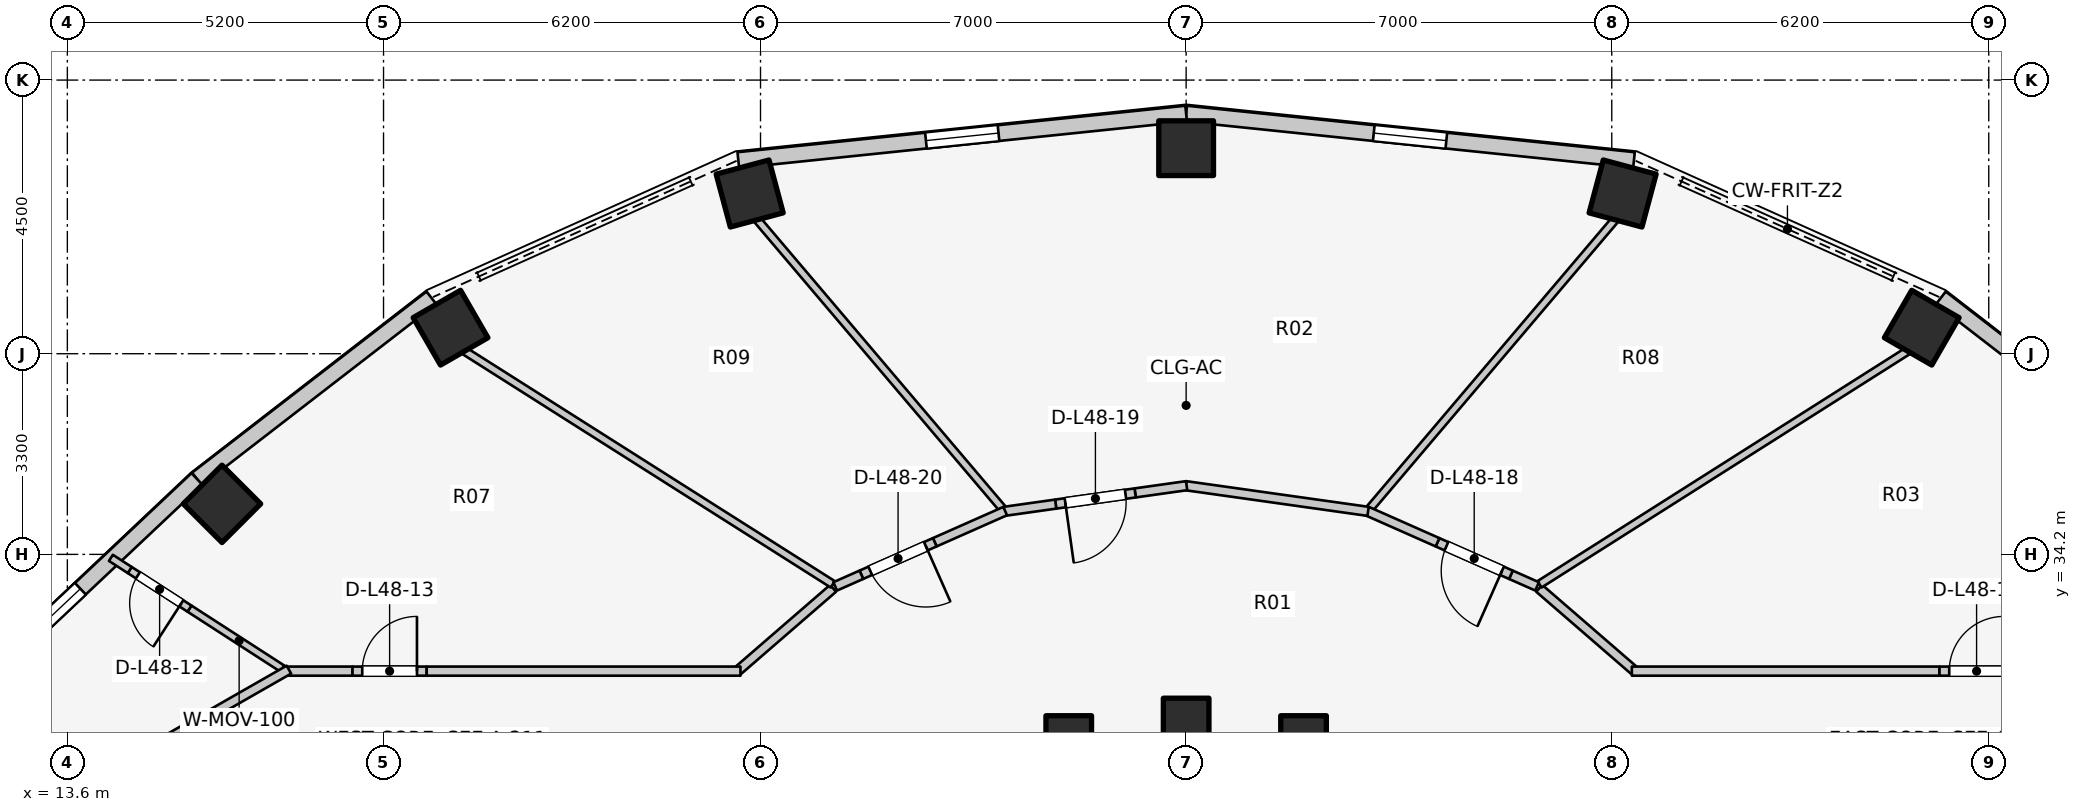
"""IFC4 building model, lengths in metres.
Left out: names, types, materials, properties, quantities, classifications, styles, units other than length and angle.
Written with IfcOpenShell. Run it as: python <this file> out.ifc"""

import sys

from ifc_helpers import new_model, si_unit, direction, frame, frame_2d, origin, origin_2d, place, context, subcontext, project, spatial, rectangle, extrude, element, fill, save


model = new_model("IFC4")
c1 = context("Model", 3, precision=1e-05, world=origin(), true_north=direction((0.0, 1.0)))
c2 = subcontext(c1, "Body", "Model", "MODEL_VIEW")
j1 = project(units=[si_unit("LENGTHUNIT", "METRE"), si_unit("PLANEANGLEUNIT", "RADIAN")], contexts=[c1])
p1 = place(None, origin())
s1 = spatial("IfcSite", under=j1, at=p1, CompositionType="ELEMENT")
p2 = place(p1, origin())
s2 = spatial("IfcBuilding", under=s1, at=p2, CompositionType="ELEMENT")
p3 = place(p2, frame((0.0, 0.0, 159.1)))
s3 = spatial("IfcBuildingStorey", under=s2, at=p3, CompositionType="ELEMENT", Elevation=159.1)
p4 = place(p3, frame((44.098, 37.928, 0.0), z_axis=(0.0, 0.0, 1.0), x_axis=(0.5, 0.866025403784, 0.0)))
e1 = element("IfcColumn", 1, at=p4, inside=s3, PredefinedType="COLUMN", context=c2, shape_type="SweptSolid", body=[
    extrude(rectangle(XDim=0.9, YDim=0.9, at=origin_2d()), origin(), (0.0, 0.0, 1.0), 3.1),
])
p5 = place(p3, frame((33.931, 31.172, 0.0), z_axis=(0.0, 0.0, 1.0), x_axis=(1.0, 0.0, 0.0)))
e2 = element("IfcColumn", 2, at=p5, inside=s3, PredefinedType="COLUMN", context=c2, shape_type="SweptSolid", body=[
    extrude(rectangle(XDim=0.75, YDim=0.75, at=origin_2d()), origin(), (0.0, 0.0, 1.0), 3.1),
])
p6 = place(p3, frame((39.178, 40.135, 0.0), z_axis=(0.0, 0.0, 1.0), x_axis=(0.258819045103, 0.965925826289, 0.0)))
e3 = element("IfcColumn", 3, at=p6, inside=s3, PredefinedType="COLUMN", context=c2, shape_type="SweptSolid", body=[
    extrude(rectangle(XDim=0.9, YDim=0.9, at=origin_2d()), origin(), (0.0, 0.0, 1.0), 3.1),
])
p7 = place(p3, frame((32.0, 31.46, 0.0), z_axis=(0.0, 0.0, 1.0), x_axis=(1.0, 0.0, 0.0)))
e4 = element("IfcColumn", 4, at=p7, inside=s3, PredefinedType="COLUMN", context=c2, shape_type="SweptSolid", body=[
    extrude(rectangle(XDim=0.75, YDim=0.75, at=origin_2d()), origin(), (0.0, 0.0, 1.0), 3.1),
])
p8 = place(p3, frame((32.0, 40.88, 0.0), z_axis=(0.0, 0.0, 1.0), x_axis=(0.0, 1.0, 0.0)))
e5 = element("IfcColumn", 5, at=p8, inside=s3, PredefinedType="COLUMN", context=c2, shape_type="SweptSolid", body=[
    extrude(rectangle(XDim=0.9, YDim=0.9, at=origin_2d()), origin(), (0.0, 0.0, 1.0), 3.1),
])
p9 = place(p3, frame((30.069, 31.172, 0.0), z_axis=(0.0, 0.0, 1.0), x_axis=(1.0, 0.0, 0.0)))
e6 = element("IfcColumn", 6, at=p9, inside=s3, PredefinedType="COLUMN", context=c2, shape_type="SweptSolid", body=[
    extrude(rectangle(XDim=0.75, YDim=0.75, at=origin_2d()), origin(), (0.0, 0.0, 1.0), 3.1),
])
for number, where, z_axis, x_axis in (
    (7, (24.822, 40.135, 0.0), (0.0, 0.0, 1.0), (-0.259, 0.966, 0.0)),
    (8, (19.902, 37.928, 0.0), (0.0, 0.0, 1.0), (-0.5, 0.866, 0.0)),
    (9, (16.143, 35.031, 0.0), (0.0, 0.0, 1.0), (-0.707, 0.707, 0.0)),
):
    element("IfcColumn", number, at=place(p3, frame(where, z_axis=z_axis, x_axis=x_axis)), inside=s3, PredefinedType="COLUMN", context=c2, shape_type="SweptSolid", body=[
        extrude(rectangle(XDim=0.9, YDim=0.9, at=origin_2d()), origin(), (0.0, 0.0, 1.0), 3.1),
    ])
p10 = place(p3, frame((48.269, 35.441, 0.0), z_axis=(0.0, 0.0, 1.0), x_axis=(-0.791460185804, 0.611220724687, 0.0)))
e10 = element("IfcWall", 10, at=p10, inside=s3, PredefinedType="STANDARD", context=c2, shape_type="SweptSolid", body=[
    extrude(rectangle(XDim=4.872, YDim=0.26, at=frame_2d((2.436, 0.0))), origin(), (0.0, 0.0, 1.0), 1.22),
])
p11 = place(p3, frame((39.365, 40.685, 0.0), z_axis=(0.0, 0.0, 1.0), x_axis=(-0.994664178965, 0.10316574569, 0.0)))
e11 = element("IfcWall", 11, at=p11, inside=s3, PredefinedType="STANDARD", context=c2, shape_type="SweptSolid", body=[
    extrude(rectangle(XDim=7.405, YDim=0.26, at=frame_2d((3.702, 0.0))), origin(), (0.0, 0.0, 1.0), 1.22),
])
p12 = place(p11, frame((3.102, 0.0, 0.15)))
e12 = element("IfcOpeningElement", 12, at=p12, cuts=e11, PredefinedType="OPENING", context=c2, shape_type="SweptSolid", body=[
    extrude(rectangle(XDim=1.2, YDim=0.9, at=frame_2d((0.6, 0.45))), frame((0.0, 0.14, 0.0), z_axis=(0.0, -1.0, 0.0), x_axis=(1.0, 0.0, 0.0)), (0.0, 0.0, 1.0), 0.28),
])
p13 = place(p3, frame((32.0, 41.448, 0.0), z_axis=(0.0, 0.0, 1.0), x_axis=(-0.994664178965, -0.10316574569, 0.0)))
e13 = element("IfcWall", 13, at=p13, inside=s3, PredefinedType="STANDARD", context=c2, shape_type="SweptSolid", body=[
    extrude(rectangle(XDim=7.405, YDim=0.26, at=frame_2d((3.702, 0.0))), origin(), (0.0, 0.0, 1.0), 1.22),
])
p14 = place(p13, frame((3.102, 0.0, 0.15)))
e14 = element("IfcOpeningElement", 14, at=p14, cuts=e13, PredefinedType="OPENING", context=c2, shape_type="SweptSolid", body=[
    extrude(rectangle(XDim=1.2, YDim=0.9, at=frame_2d((0.6, 0.45))), frame((0.0, 0.14, 0.0), z_axis=(0.0, -1.0, 0.0), x_axis=(1.0, 0.0, 0.0)), (0.0, 0.0, 1.0), 0.28),
])
p15 = place(p3, frame((19.587, 38.419, 0.0), z_axis=(0.0, 0.0, 1.0), x_axis=(-0.791460185804, -0.611220724687, 0.0)))
e15 = element("IfcWall", 15, at=p15, inside=s3, PredefinedType="STANDARD", context=c2, shape_type="SweptSolid", body=[
    extrude(rectangle(XDim=4.872, YDim=0.26, at=frame_2d((2.436, 0.0))), origin(), (0.0, 0.0, 1.0), 1.22),
])
p16 = place(p3, frame((15.731, 35.441, 0.0), z_axis=(0.0, 0.0, 1.0), x_axis=(-0.727667301037, -0.68593024354, 0.0)))
e16 = element("IfcWall", 16, at=p16, inside=s3, PredefinedType="STANDARD", context=c2, shape_type="SweptSolid", body=[
    extrude(rectangle(XDim=4.604, YDim=0.26, at=frame_2d((2.302, 0.0))), origin(), (0.0, 0.0, 1.0), 1.22),
])
p17 = place(p16, frame((2.634, 0.0, 0.15)))
e17 = element("IfcOpeningElement", 17, at=p17, cuts=e16, PredefinedType="OPENING", context=c2, shape_type="SweptSolid", body=[
    extrude(rectangle(XDim=1.2, YDim=0.9, at=frame_2d((0.6, 0.45))), frame((0.0, 0.14, 0.0), z_axis=(0.0, -1.0, 0.0), x_axis=(1.0, 0.0, 0.0)), (0.0, 0.0, 1.0), 0.28),
])
p18 = place(p3, frame((37.807, 33.642, 0.0), z_axis=(0.0, 0.0, 1.0), x_axis=(0.756055312247, -0.654507727092, 0.0)))
e18 = element("IfcWall", 18, at=p18, inside=s3, PredefinedType="PARTITIONING", context=c2, shape_type="SweptSolid", body=[
    extrude(rectangle(XDim=2.111, YDim=0.15, at=frame_2d((1.055, 0.0))), origin(), (0.0, 0.0, 1.0), 1.22),
])
p19 = place(p3, frame((39.33, 32.28, 0.0), z_axis=(0.0, 0.0, 1.0), x_axis=(1.0, 0.0, 0.0)))
e19 = element("IfcWall", 19, at=p19, inside=s3, PredefinedType="PARTITIONING", context=c2, shape_type="SweptSolid", body=[
    extrude(rectangle(XDim=5.06, YDim=0.15, at=frame_2d((2.53, 0.0))), origin(), (0.0, 0.0, 1.0), 1.22),
])
p20 = place(p3, frame((44.39, 32.28, 0.0), z_axis=(0.0, 0.0, 1.0), x_axis=(1.0, 0.0, 0.0)))
e20 = element("IfcWall", 20, at=p20, inside=s3, PredefinedType="PARTITIONING", context=c2, shape_type="SweptSolid", body=[
    extrude(rectangle(XDim=1.22, YDim=0.15, at=frame_2d((0.61, 0.0))), origin(), (0.0, 0.0, 1.0), 2.16),
])
p21 = place(p20, frame((0.16, 0.0, 0.0)))
e21 = element("IfcOpeningElement", 21, at=p21, cuts=e20, PredefinedType="OPENING", context=c2, shape_type="SweptSolid", body=[
    extrude(rectangle(XDim=0.9, YDim=2.1, at=frame_2d((0.45, 1.05))), frame((0.0, 0.085, 0.0), z_axis=(0.0, -1.0, 0.0), x_axis=(1.0, 0.0, 0.0)), (0.0, 0.0, 1.0), 0.17),
])
p22 = place(p3, frame((17.242, 32.253, 0.0), z_axis=(0.0, 0.0, 1.0), x_axis=(-0.839960690577, 0.542647250325, 0.0)))
e22 = element("IfcWall", 22, at=p22, inside=s3, PredefinedType="MOVABLE", context=c2, shape_type="SweptSolid", body=[
    extrude(rectangle(XDim=1.945, YDim=0.12, at=frame_2d((0.972, 0.0))), origin(), (0.0, 0.0, 1.0), 1.22),
])
p23 = place(p3, frame((15.609, 33.308, 0.0), z_axis=(0.0, 0.0, 1.0), x_axis=(-0.839989837614, 0.542602131129, 0.0)))
e23 = element("IfcWall", 23, at=p23, inside=s3, PredefinedType="MOVABLE", context=c2, shape_type="SweptSolid", body=[
    extrude(rectangle(XDim=1.17, YDim=0.12, at=frame_2d((0.585, 0.0))), origin(), (0.0, 0.0, 1.0), 2.11),
])
p24 = place(p23, frame((0.16, 0.0, 0.0)))
e24 = element("IfcOpeningElement", 24, at=p24, cuts=e23, PredefinedType="OPENING", context=c2, shape_type="SweptSolid", body=[
    extrude(rectangle(XDim=0.85, YDim=2.05, at=frame_2d((0.425, 1.025))), frame((0.0, 0.07, 0.0), z_axis=(0.0, -1.0, 0.0), x_axis=(1.0, 0.0, 0.0)), (0.0, 0.0, 1.0), 0.14),
])
p25 = place(p3, frame((14.626, 33.943, 0.0), z_axis=(0.0, 0.0, 1.0), x_axis=(-0.840014217141, 0.542564387885, 0.0)))
e25 = element("IfcWall", 25, at=p25, inside=s3, PredefinedType="MOVABLE", context=c2, shape_type="SweptSolid", body=[
    extrude(rectangle(XDim=0.368, YDim=0.12, at=frame_2d((0.184, 0.0))), origin(), (0.0, 0.0, 1.0), 2.575),
])
p26 = place(p3, frame((26.193, 33.642, 0.0), z_axis=(0.0, 0.0, 1.0), x_axis=(-0.756055312247, -0.654507727092, 0.0)))
e26 = element("IfcWall", 26, at=p26, inside=s3, PredefinedType="PARTITIONING", context=c2, shape_type="SweptSolid", body=[
    extrude(rectangle(XDim=2.111, YDim=0.15, at=frame_2d((1.055, 0.0))), origin(), (0.0, 0.0, 1.0), 1.22),
])
p27 = place(p3, frame((17.15, 32.28, 0.0), z_axis=(0.0, 0.0, 1.0), x_axis=(1.0, 0.0, 0.0)))
e27 = element("IfcWall", 27, at=p27, inside=s3, PredefinedType="PARTITIONING", context=c2, shape_type="SweptSolid", body=[
    extrude(rectangle(XDim=1.14, YDim=0.15, at=frame_2d((0.57, 0.0))), origin(), (0.0, 0.0, 1.0), 2.575),
])
p28 = place(p3, frame((18.29, 32.28, 0.0), z_axis=(0.0, 0.0, 1.0), x_axis=(1.0, 0.0, 0.0)))
e28 = element("IfcWall", 28, at=p28, inside=s3, PredefinedType="PARTITIONING", context=c2, shape_type="SweptSolid", body=[
    extrude(rectangle(XDim=1.22, YDim=0.15, at=frame_2d((0.61, 0.0))), origin(), (0.0, 0.0, 1.0), 2.575),
])
p29 = place(p28, frame((0.16, 0.0, 0.0)))
e29 = element("IfcOpeningElement", 29, at=p29, cuts=e28, PredefinedType="OPENING", context=c2, shape_type="SweptSolid", body=[
    extrude(rectangle(XDim=0.9, YDim=2.1, at=frame_2d((0.45, 1.05))), frame((0.0, 0.085, 0.0), z_axis=(0.0, -1.0, 0.0), x_axis=(1.0, 0.0, 0.0)), (0.0, 0.0, 1.0), 0.17),
])
p30 = place(p3, frame((19.51, 32.28, 0.0), z_axis=(0.0, 0.0, 1.0), x_axis=(1.0, 0.0, 0.0)))
e30 = element("IfcWall", 30, at=p30, inside=s3, PredefinedType="PARTITIONING", context=c2, shape_type="SweptSolid", body=[
    extrude(rectangle(XDim=5.16, YDim=0.15, at=frame_2d((2.58, 0.0))), origin(), (0.0, 0.0, 1.0), 1.22),
])
p31 = place(p3, frame((17.243, 32.305, 0.0), z_axis=(0.0, 0.0, 1.0), x_axis=(-0.867991349648, -0.496579315857, 0.0)))
e31 = element("IfcWall", 31, at=p31, inside=s3, PredefinedType="PARTITIONING", context=c2, shape_type="SweptSolid", body=[
    extrude(rectangle(XDim=2.567, YDim=0.15, at=frame_2d((1.283, 0.0))), origin(), (0.0, 0.0, 1.0), 1.22),
])
p32 = place(p3, frame((37.812, 33.708, 0.0), z_axis=(0.0, 0.0, 1.0), x_axis=(0.844640430122, 0.535334048799, 0.0)))
e32 = element("IfcWall", 32, at=p32, inside=s3, PredefinedType="PARTITIONING", context=c2, shape_type="SweptSolid", body=[
    extrude(rectangle(XDim=7.188, YDim=0.125, at=frame_2d((3.594, 0.0))), origin(), (0.0, 0.0, 1.0), 1.22),
])
for number, where, z_axis, x_axis in (
    (33, (35.02, 34.952, 0.0), (0.0, 0.0, 1.0), (0.647, 0.762, 0.0)),
    (34, (28.98, 34.952, 0.0), (0.0, 0.0, 1.0), (-0.647, 0.762, 0.0)),
):
    element("IfcWall", number, at=place(p3, frame(where, z_axis=z_axis, x_axis=x_axis)), inside=s3, PredefinedType="PARTITIONING", context=c2, shape_type="SweptSolid", body=[
        extrude(rectangle(XDim=6.253, YDim=0.125, at=frame_2d((3.127, 0.0))), origin(), (0.0, 0.0, 1.0), 1.22),
    ])
p33 = place(p3, frame((26.188, 33.708, 0.0), z_axis=(0.0, 0.0, 1.0), x_axis=(-0.844640430122, 0.535334048799, 0.0)))
e35 = element("IfcWall", 35, at=p33, inside=s3, PredefinedType="PARTITIONING", context=c2, shape_type="SweptSolid", body=[
    extrude(rectangle(XDim=7.188, YDim=0.125, at=frame_2d((3.594, 0.0))), origin(), (0.0, 0.0, 1.0), 1.22),
])
p34 = place(p3, frame((37.772, 33.674, 0.0), z_axis=(0.0, 0.0, 1.0), x_axis=(-0.914387769504, 0.404839482983, 0.0)))
e36 = element("IfcWall", 36, at=p34, inside=s3, PredefinedType="PARTITIONING", context=c2, shape_type="SweptSolid", body=[
    extrude(rectangle(XDim=0.471, YDim=0.15, at=frame_2d((0.235, 0.0))), origin(), (0.0, 0.0, 1.0), 2.575),
])
p35 = place(p3, frame((37.341, 33.865, 0.0), z_axis=(0.0, 0.0, 1.0), x_axis=(-0.914314172667, 0.405005671145, 0.0)))
e37 = element("IfcWall", 37, at=p35, inside=s3, PredefinedType="PARTITIONING", context=c2, shape_type="SweptSolid", body=[
    extrude(rectangle(XDim=1.32, YDim=0.15, at=frame_2d((0.66, 0.0))), origin(), (0.0, 0.0, 1.0), 2.16),
])
p36 = place(p35, frame((0.16, 0.0, 0.0)))
e38 = element("IfcOpeningElement", 38, at=p36, cuts=e37, PredefinedType="OPENING", context=c2, shape_type="SweptSolid", body=[
    extrude(rectangle(XDim=1.0, YDim=2.1, at=frame_2d((0.5, 1.05))), frame((0.0, 0.085, 0.0), z_axis=(0.0, -1.0, 0.0), x_axis=(1.0, 0.0, 0.0)), (0.0, 0.0, 1.0), 0.17),
])
p37 = place(p3, frame((36.134, 34.399, 0.0), z_axis=(0.0, 0.0, 1.0), x_axis=(-0.914311660367, 0.405011342701, 0.0)))
e39 = element("IfcWall", 39, at=p37, inside=s3, PredefinedType="PARTITIONING", context=c2, shape_type="SweptSolid", body=[
    extrude(rectangle(XDim=1.267, YDim=0.15, at=frame_2d((0.633, 0.0))), origin(), (0.0, 0.0, 1.0), 1.22),
])
p38 = place(p3, frame((34.992, 34.908, 0.0), z_axis=(0.0, 0.0, 1.0), x_axis=(-0.990234341072, 0.139412875167, 0.0)))
e40 = element("IfcWall", 40, at=p38, inside=s3, PredefinedType="PARTITIONING", context=c2, shape_type="SweptSolid", body=[
    extrude(rectangle(XDim=3.03, YDim=0.15, at=frame_2d((1.515, 0.0))), origin(), (0.0, 0.0, 1.0), 1.22),
])
p39 = place(p3, frame((32.008, 35.33, 0.0), z_axis=(0.0, 0.0, 1.0), x_axis=(-0.990199264419, -0.139661794145, 0.0)))
e41 = element("IfcWall", 41, at=p39, inside=s3, PredefinedType="PARTITIONING", context=c2, shape_type="SweptSolid", body=[
    extrude(rectangle(XDim=0.855, YDim=0.15, at=frame_2d((0.427, 0.0))), origin(), (0.0, 0.0, 1.0), 1.22),
])
p40 = place(p3, frame((31.162, 35.211, 0.0), z_axis=(0.0, 0.0, 1.0), x_axis=(-0.990254187593, -0.139271834751, 0.0)))
e42 = element("IfcWall", 42, at=p40, inside=s3, PredefinedType="PARTITIONING", context=c2, shape_type="SweptSolid", body=[
    extrude(rectangle(XDim=1.32, YDim=0.15, at=frame_2d((0.66, 0.0))), origin(), (0.0, 0.0, 1.0), 2.575),
])
p41 = place(p40, frame((0.16, 0.0, 0.0)))
e43 = element("IfcOpeningElement", 43, at=p41, cuts=e42, PredefinedType="OPENING", context=c2, shape_type="SweptSolid", body=[
    extrude(rectangle(XDim=1.0, YDim=2.1, at=frame_2d((0.5, 1.05))), frame((0.0, 0.085, 0.0), z_axis=(0.0, -1.0, 0.0), x_axis=(1.0, 0.0, 0.0)), (0.0, 0.0, 1.0), 0.17),
])
p42 = place(p3, frame((29.854, 35.027, 0.0), z_axis=(0.0, 0.0, 1.0), x_axis=(-0.990238723834, -0.139381741342, 0.0)))
e44 = element("IfcWall", 44, at=p42, inside=s3, PredefinedType="PARTITIONING", context=c2, shape_type="SweptSolid", body=[
    extrude(rectangle(XDim=0.855, YDim=0.15, at=frame_2d((0.427, 0.0))), origin(), (0.0, 0.0, 1.0), 2.575),
])
p43 = place(p3, frame((29.024, 34.912, 0.0), z_axis=(0.0, 0.0, 1.0), x_axis=(-0.914311660367, -0.405011342701, 0.0)))
e45 = element("IfcWall", 45, at=p43, inside=s3, PredefinedType="PARTITIONING", context=c2, shape_type="SweptSolid", body=[
    extrude(rectangle(XDim=1.267, YDim=0.15, at=frame_2d((0.633, 0.0))), origin(), (0.0, 0.0, 1.0), 1.22),
])
p44 = place(p3, frame((27.866, 34.399, 0.0), z_axis=(0.0, 0.0, 1.0), x_axis=(-0.914314172667, -0.405005671145, 0.0)))
e46 = element("IfcWall", 46, at=p44, inside=s3, PredefinedType="PARTITIONING", context=c2, shape_type="SweptSolid", body=[
    extrude(rectangle(XDim=1.32, YDim=0.15, at=frame_2d((0.66, 0.0))), origin(), (0.0, 0.0, 1.0), 2.16),
])
p45 = place(p44, frame((0.16, 0.0, 0.0)))
e47 = element("IfcOpeningElement", 47, at=p45, cuts=e46, PredefinedType="OPENING", context=c2, shape_type="SweptSolid", body=[
    extrude(rectangle(XDim=1.0, YDim=2.1, at=frame_2d((0.5, 1.05))), frame((0.0, 0.085, 0.0), z_axis=(0.0, -1.0, 0.0), x_axis=(1.0, 0.0, 0.0)), (0.0, 0.0, 1.0), 0.17),
])
p46 = place(p3, frame((26.659, 33.865, 0.0), z_axis=(0.0, 0.0, 1.0), x_axis=(-0.914387769504, -0.404839482983, 0.0)))
e48 = element("IfcWall", 48, at=p46, inside=s3, PredefinedType="PARTITIONING", context=c2, shape_type="SweptSolid", body=[
    extrude(rectangle(XDim=0.471, YDim=0.15, at=frame_2d((0.235, 0.0))), origin(), (0.0, 0.0, 1.0), 2.575),
])
p47 = place(p12, origin())
e49 = element("IfcWindow", 49, at=p47, inside=s3, PartitioningType="SINGLE_PANEL", PredefinedType="WINDOW", context=c2, shape_type="SweptSolid", body=[
    extrude(rectangle(XDim=1.2, YDim=0.9, at=frame_2d((0.6, 0.45))), frame((0.0, 0.03, 0.0), z_axis=(0.0, -1.0, 0.0), x_axis=(1.0, 0.0, 0.0)), (0.0, 0.0, 1.0), 0.06),
])
fill(e12, e49)
p48 = place(p14, origin())
e50 = element("IfcWindow", 50, at=p48, inside=s3, PartitioningType="SINGLE_PANEL", PredefinedType="WINDOW", context=c2, shape_type="SweptSolid", body=[
    extrude(rectangle(XDim=1.2, YDim=0.9, at=frame_2d((0.6, 0.45))), frame((0.0, 0.03, 0.0), z_axis=(0.0, -1.0, 0.0), x_axis=(1.0, 0.0, 0.0)), (0.0, 0.0, 1.0), 0.06),
])
fill(e14, e50)
p49 = place(p17, origin())
e51 = element("IfcWindow", 51, at=p49, inside=s3, PartitioningType="SINGLE_PANEL", PredefinedType="WINDOW", context=c2, shape_type="SweptSolid", body=[
    extrude(rectangle(XDim=1.2, YDim=0.9, at=frame_2d((0.6, 0.45))), frame((0.0, 0.03, 0.0), z_axis=(0.0, -1.0, 0.0), x_axis=(1.0, 0.0, 0.0)), (0.0, 0.0, 1.0), 0.06),
])
fill(e17, e51)
p50 = place(p21, origin())
e52 = element("IfcDoor", 52, at=p50, inside=s3, OperationType="SINGLE_SWING_RIGHT", PredefinedType="DOOR", context=c2, shape_type="SweptSolid", body=[
    extrude(rectangle(XDim=0.9, YDim=2.1, at=frame_2d((0.45, 1.05))), frame((0.0, 0.025, 0.0), z_axis=(0.0, -1.0, 0.0), x_axis=(1.0, 0.0, 0.0)), (0.0, 0.0, 1.0), 0.05),
])
fill(e21, e52)
p51 = place(p24, origin())
e53 = element("IfcDoor", 53, at=p51, inside=s3, OperationType="SINGLE_SWING_LEFT", PredefinedType="DOOR", context=c2, shape_type="SweptSolid", body=[
    extrude(rectangle(XDim=0.85, YDim=2.05, at=frame_2d((0.425, 1.025))), frame((0.0, 0.025, 0.0), z_axis=(0.0, -1.0, 0.0), x_axis=(1.0, 0.0, 0.0)), (0.0, 0.0, 1.0), 0.05),
])
fill(e24, e53)
p52 = place(p29, origin())
e54 = element("IfcDoor", 54, at=p52, inside=s3, OperationType="SINGLE_SWING_RIGHT", PredefinedType="DOOR", context=c2, shape_type="SweptSolid", body=[
    extrude(rectangle(XDim=0.9, YDim=2.1, at=frame_2d((0.45, 1.05))), frame((0.0, 0.025, 0.0), z_axis=(0.0, -1.0, 0.0), x_axis=(1.0, 0.0, 0.0)), (0.0, 0.0, 1.0), 0.05),
])
fill(e29, e54)
p53 = place(p36, origin())
e55 = element("IfcDoor", 55, at=p53, inside=s3, OperationType="SINGLE_SWING_LEFT", PredefinedType="DOOR", context=c2, shape_type="SweptSolid", body=[
    extrude(rectangle(XDim=1.0, YDim=2.1, at=frame_2d((0.5, 1.05))), frame((0.0, 0.025, 0.0), z_axis=(0.0, -1.0, 0.0), x_axis=(1.0, 0.0, 0.0)), (0.0, 0.0, 1.0), 0.05),
])
fill(e38, e55)
p54 = place(p41, origin())
e56 = element("IfcDoor", 56, at=p54, inside=s3, OperationType="SINGLE_SWING_RIGHT", PredefinedType="DOOR", context=c2, shape_type="SweptSolid", body=[
    extrude(rectangle(XDim=1.0, YDim=2.1, at=frame_2d((0.5, 1.05))), frame((0.0, 0.025, 0.0), z_axis=(0.0, -1.0, 0.0), x_axis=(1.0, 0.0, 0.0)), (0.0, 0.0, 1.0), 0.05),
])
fill(e43, e56)
p55 = place(p45, origin())
e57 = element("IfcDoor", 57, at=p55, inside=s3, OperationType="SINGLE_SWING_LEFT", PredefinedType="DOOR", context=c2, shape_type="SweptSolid", body=[
    extrude(rectangle(XDim=1.0, YDim=2.1, at=frame_2d((0.5, 1.05))), frame((0.0, 0.025, 0.0), z_axis=(0.0, -1.0, 0.0), x_axis=(1.0, 0.0, 0.0)), (0.0, 0.0, 1.0), 0.05),
])
fill(e47, e57)
save(model, sys.argv[1])
